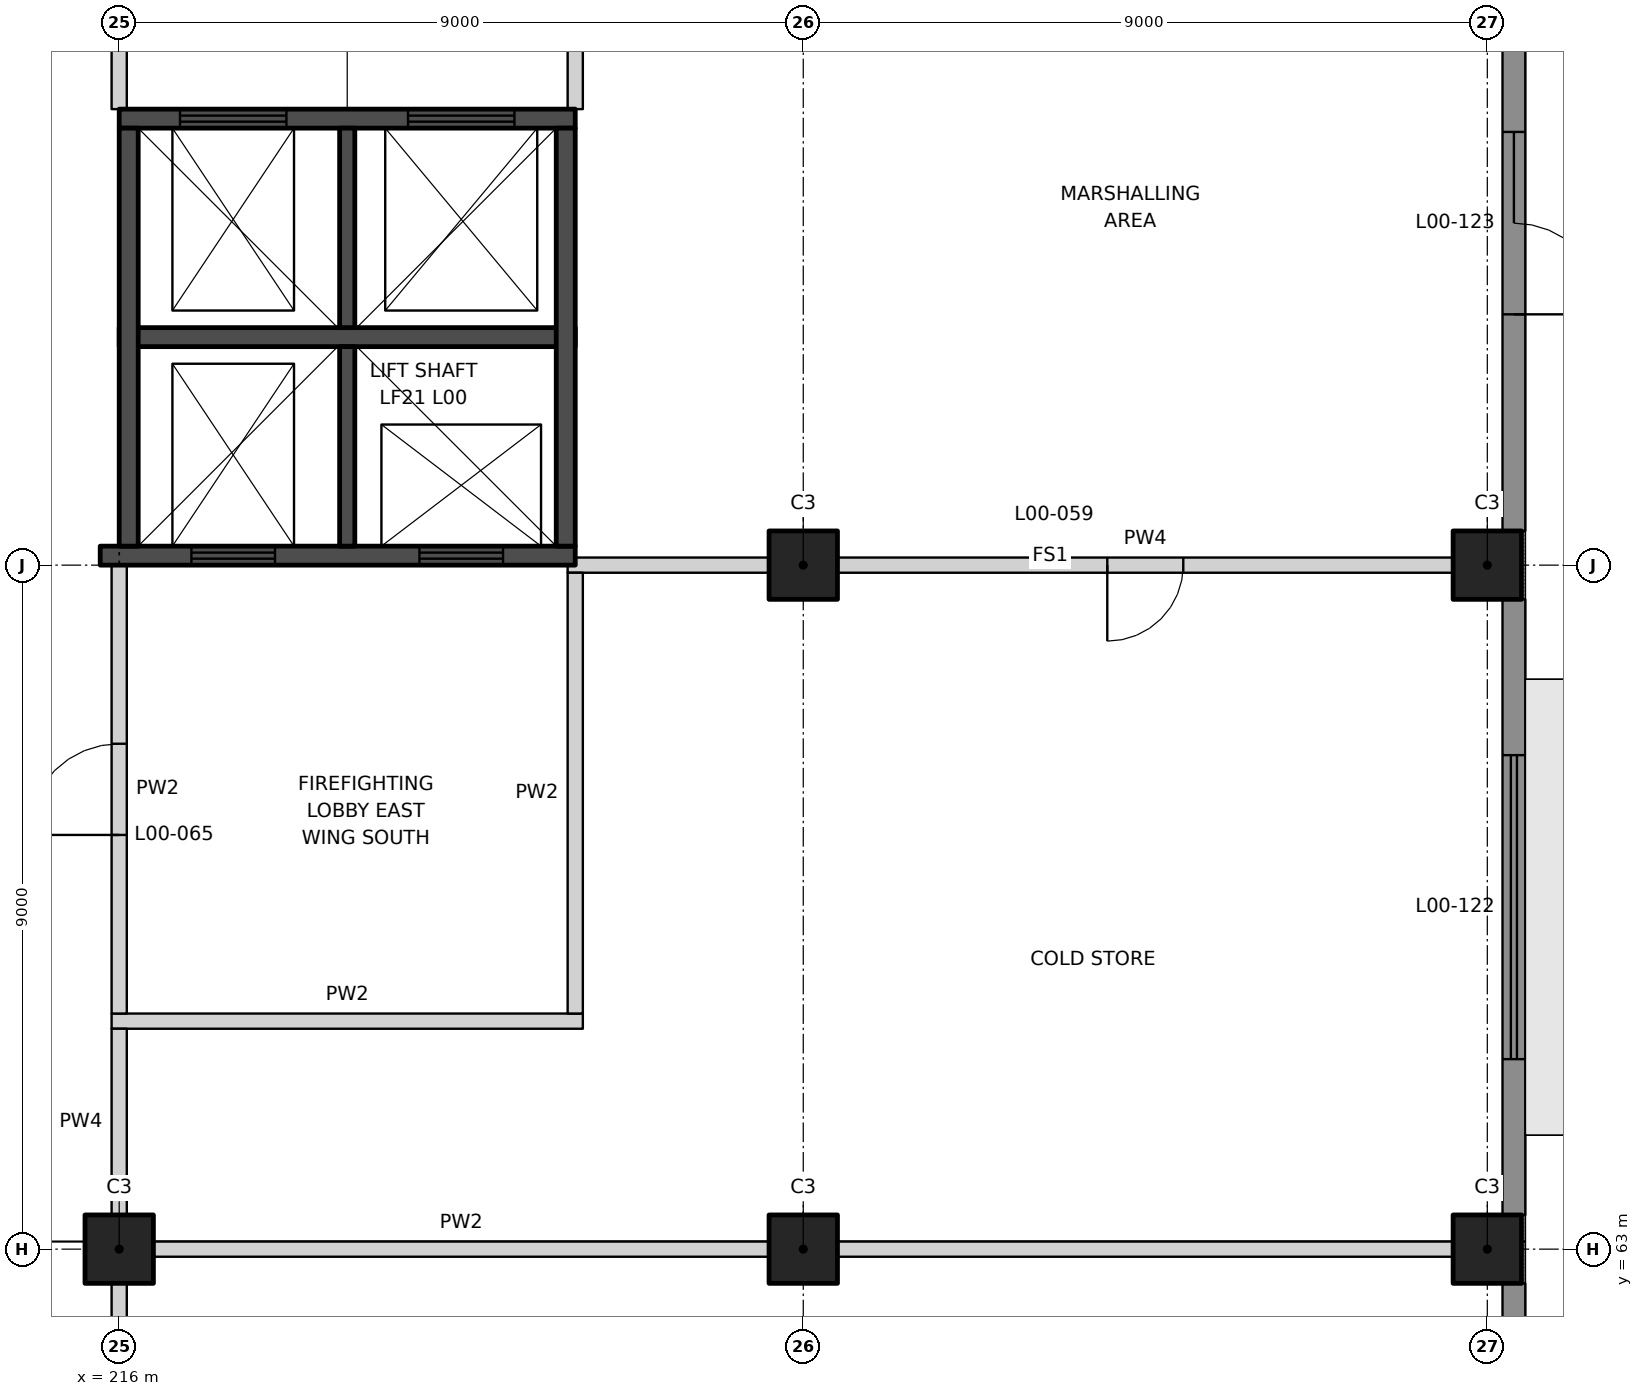
"""IFC4 building model, lengths in metres.
Left out: names, types, materials, properties, quantities, classifications, styles, units other than length and angle.
Written with IfcOpenShell. Run it as: python <this file> out.ifc"""

import sys

from ifc_helpers import new_model, si_unit, direction, frame, frame_2d, origin, origin_2d, place, context, subcontext, project, spatial, rectangle, extrude, element, fill, save


model = new_model("IFC4")
c1 = context("Model", 3, precision=1e-05, world=origin(), true_north=direction((0.0, 1.0)))
c2 = subcontext(c1, "Body", "Model", "MODEL_VIEW")
j1 = project(units=[si_unit("LENGTHUNIT", "METRE"), si_unit("PLANEANGLEUNIT", "RADIAN")], contexts=[c1])
p1 = place(None, origin())
s1 = spatial("IfcSite", under=j1, at=p1, CompositionType="ELEMENT")
p2 = place(p1, origin())
s2 = spatial("IfcBuilding", under=s1, at=p2, CompositionType="ELEMENT")
p3 = place(p2, origin())
s3 = spatial("IfcBuildingStorey", under=s2, at=p3, CompositionType="ELEMENT", Elevation=0.0)
for number, where, z_axis, x_axis in (
    (1, (216.0, 63.0, 0.0), (0.0, 0.0, 1.0), (1.0, 0.0, 0.0)),
    (2, (225.0, 63.0, 0.0), (0.0, 0.0, 1.0), (1.0, 0.0, 0.0)),
    (3, (225.0, 72.0, 0.0), (0.0, 0.0, 1.0), (1.0, 0.0, 0.0)),
    (4, (234.0, 63.0, 0.0), (0.0, 0.0, 1.0), (1.0, 0.0, 0.0)),
    (5, (234.0, 72.0, 0.0), (0.0, 0.0, 1.0), (1.0, 0.0, 0.0)),
):
    element("IfcColumn", number, at=place(p3, frame(where, z_axis=z_axis, x_axis=x_axis)), inside=s3, PredefinedType="COLUMN", context=c2, shape_type="SweptSolid", body=[
        extrude(rectangle(XDim=0.9, YDim=0.9, at=origin_2d()), origin(), (0.0, 0.0, 1.0), 7.0),
    ])
for number, where, z_axis, x_axis in (
    (6, (225.45, 63.0, 0.0), (0.0, 0.0, 1.0), (1.0, 0.0, 0.0)),
    (7, (216.45, 63.0, 0.0), (0.0, 0.0, 1.0), (1.0, 0.0, 0.0)),
):
    element("IfcWall", number, at=place(p3, frame(where, z_axis=z_axis, x_axis=x_axis)), inside=s3, PredefinedType="PARTITIONING", context=c2, shape_type="SweptSolid", body=[
        extrude(rectangle(XDim=8.1, YDim=0.2, at=frame_2d((4.05, 0.0))), origin(), (0.0, 0.0, 1.0), 5.75),
    ])
p4 = place(p3, frame((215.9, 66.0, 0.0), z_axis=(0.0, 0.0, 1.0), x_axis=(1.0, 0.0, 0.0)))
e8 = element("IfcWall", 8, at=p4, inside=s3, PredefinedType="PARTITIONING", context=c2, shape_type="SweptSolid", body=[
    extrude(rectangle(XDim=6.2, YDim=0.2, at=frame_2d((3.1, 0.0))), origin(), (0.0, 0.0, 1.0), 7.0),
])
p5 = place(p3, frame((225.45, 72.0, 0.0), z_axis=(0.0, 0.0, 1.0), x_axis=(1.0, 0.0, 0.0)))
e9 = element("IfcWall", 9, at=p5, inside=s3, PredefinedType="PARTITIONING", context=c2, shape_type="SweptSolid", body=[
    extrude(rectangle(XDim=8.1, YDim=0.2, at=frame_2d((4.05, 0.0))), origin(), (0.0, 0.0, 1.0), 5.75),
])
p6 = place(p5, frame((3.55, 0.0, 0.0)))
e10 = element("IfcOpeningElement", 10, at=p6, cuts=e9, PredefinedType="OPENING", context=c2, shape_type="SweptSolid", body=[
    extrude(rectangle(XDim=1.0, YDim=2.1, at=frame_2d((0.5, 1.05))), frame((0.0, 0.11, 0.0), z_axis=(0.0, -1.0, 0.0), x_axis=(1.0, 0.0, 0.0)), (0.0, 0.0, 1.0), 0.22),
])
p7 = place(p3, frame((221.9, 72.0, 0.0), z_axis=(0.0, 0.0, 1.0), x_axis=(1.0, 0.0, 0.0)))
e11 = element("IfcWall", 11, at=p7, inside=s3, PredefinedType="PARTITIONING", context=c2, shape_type="SweptSolid", body=[
    extrude(rectangle(XDim=2.65, YDim=0.2, at=frame_2d((1.325, 0.0))), origin(), (0.0, 0.0, 1.0), 5.95),
])
p8 = place(p3, frame((216.0, 54.45, 0.0), z_axis=(0.0, 0.0, 1.0), x_axis=(0.0, 1.0, 0.0)))
e12 = element("IfcWall", 12, at=p8, inside=s3, PredefinedType="PARTITIONING", context=c2, shape_type="SweptSolid", body=[
    extrude(rectangle(XDim=8.1, YDim=0.2, at=frame_2d((4.05, 0.0))), origin(), (0.0, 0.0, 1.0), 5.75),
])
p9 = place(p8, frame((3.15, 0.0, 0.0)))
e13 = element("IfcOpeningElement", 13, at=p9, cuts=e12, PredefinedType="OPENING", context=c2, shape_type="SweptSolid", body=[
    extrude(rectangle(XDim=1.8, YDim=2.1, at=frame_2d((0.9, 1.05))), frame((0.0, 0.11, 0.0), z_axis=(0.0, -1.0, 0.0), x_axis=(1.0, 0.0, 0.0)), (0.0, 0.0, 1.0), 0.22),
])
p10 = place(p8, frame((0.2, 0.0, 0.0)))
e14 = element("IfcOpeningElement", 14, at=p10, cuts=e12, PredefinedType="OPENING", context=c2, shape_type="SweptSolid", body=[
    extrude(rectangle(XDim=1.8, YDim=2.1, at=frame_2d((0.9, 1.05))), frame((0.0, 0.11, 0.0), z_axis=(0.0, -1.0, 0.0), x_axis=(1.0, 0.0, 0.0)), (0.0, 0.0, 1.0), 0.22),
])
p11 = place(p3, frame((216.0, 63.45, 0.0), z_axis=(0.0, 0.0, 1.0), x_axis=(0.0, 1.0, 0.0)))
e15 = element("IfcWall", 15, at=p11, inside=s3, PredefinedType="PARTITIONING", context=c2, shape_type="SweptSolid", body=[
    extrude(rectangle(XDim=2.45, YDim=0.2, at=frame_2d((1.225, 0.0))), origin(), (0.0, 0.0, 1.0), 5.65),
])
p12 = place(p3, frame((216.0, 66.1, 0.0), z_axis=(0.0, 0.0, 1.0), x_axis=(0.0, 1.0, 0.0)))
e16 = element("IfcWall", 16, at=p12, inside=s3, PredefinedType="PARTITIONING", context=c2, shape_type="SweptSolid", body=[
    extrude(rectangle(XDim=5.9, YDim=0.2, at=frame_2d((2.95, 0.0))), origin(), (0.0, 0.0, 1.0), 5.65),
])
p13 = place(p12, frame((2.35, 0.0, 0.0)))
e17 = element("IfcOpeningElement", 17, at=p13, cuts=e16, PredefinedType="OPENING", context=c2, shape_type="SweptSolid", body=[
    extrude(rectangle(XDim=1.2, YDim=2.1, at=frame_2d((0.6, 1.05))), frame((0.0, 0.11, 0.0), z_axis=(0.0, -1.0, 0.0), x_axis=(1.0, 0.0, 0.0)), (0.0, 0.0, 1.0), 0.22),
])
p14 = place(p3, frame((216.0, 78.0, 0.0), z_axis=(0.0, 0.0, 1.0), x_axis=(0.0, 1.0, 0.0)))
e18 = element("IfcWall", 18, at=p14, inside=s3, PredefinedType="PARTITIONING", context=c2, shape_type="SweptSolid", body=[
    extrude(rectangle(XDim=2.55, YDim=0.2, at=frame_2d((1.275, 0.0))), origin(), (0.0, 0.0, 1.0), 5.95),
])
p15 = place(p3, frame((222.0, 66.1, 0.0), z_axis=(0.0, 0.0, 1.0), x_axis=(0.0, 1.0, 0.0)))
e19 = element("IfcWall", 19, at=p15, inside=s3, PredefinedType="PARTITIONING", context=c2, shape_type="SweptSolid", body=[
    extrude(rectangle(XDim=5.8, YDim=0.2, at=frame_2d((2.9, 0.0))), origin(), (0.0, 0.0, 1.0), 7.0),
])
p16 = place(p3, frame((222.0, 78.0, 0.0), z_axis=(0.0, 0.0, 1.0), x_axis=(0.0, 1.0, 0.0)))
e20 = element("IfcWall", 20, at=p16, inside=s3, PredefinedType="PARTITIONING", context=c2, shape_type="SweptSolid", body=[
    extrude(rectangle(XDim=5.9, YDim=0.2, at=frame_2d((2.95, 0.0))), origin(), (0.0, 0.0, 1.0), 7.0),
])
p17 = place(p3, frame((234.35, 54.45, 0.0), z_axis=(0.0, 0.0, 1.0), x_axis=(0.0, 1.0, 0.0)))
e21 = element("IfcWall", 21, at=p17, inside=s3, PredefinedType="SOLIDWALL", context=c2, shape_type="SweptSolid", body=[
    extrude(rectangle(XDim=8.1, YDim=0.3, at=frame_2d((4.05, 0.0))), origin(), (0.0, 0.0, 1.0), 7.0),
])
p18 = place(p17, frame((2.85, 0.0, 0.0)))
e22 = element("IfcOpeningElement", 22, at=p18, cuts=e21, PredefinedType="OPENING", context=c2, shape_type="SweptSolid", body=[
    extrude(rectangle(XDim=2.4, YDim=2.4, at=frame_2d((1.2, 1.2))), frame((0.0, 0.16, 0.0), z_axis=(0.0, -1.0, 0.0), x_axis=(1.0, 0.0, 0.0)), (0.0, 0.0, 1.0), 0.32),
])
p19 = place(p3, frame((234.35, 63.45, 0.0), z_axis=(0.0, 0.0, 1.0), x_axis=(0.0, 1.0, 0.0)))
e23 = element("IfcWall", 23, at=p19, inside=s3, PredefinedType="SOLIDWALL", context=c2, shape_type="SweptSolid", body=[
    extrude(rectangle(XDim=8.1, YDim=0.3, at=frame_2d((4.05, 0.0))), origin(), (0.0, 0.0, 1.0), 7.0),
])
p20 = place(p19, frame((2.05, 0.0, 0.0)))
e24 = element("IfcOpeningElement", 24, at=p20, cuts=e23, PredefinedType="OPENING", context=c2, shape_type="SweptSolid", body=[
    extrude(rectangle(XDim=4.0, YDim=4.5, at=frame_2d((2.0, 2.25))), frame((0.0, 0.16, 0.0), z_axis=(0.0, -1.0, 0.0), x_axis=(1.0, 0.0, 0.0)), (0.0, 0.0, 1.0), 0.32),
])
p21 = place(p3, frame((234.35, 72.45, 0.0), z_axis=(0.0, 0.0, 1.0), x_axis=(0.0, 1.0, 0.0)))
e25 = element("IfcWall", 25, at=p21, inside=s3, PredefinedType="SOLIDWALL", context=c2, shape_type="SweptSolid", body=[
    extrude(rectangle(XDim=8.1, YDim=0.3, at=frame_2d((4.05, 0.0))), origin(), (0.0, 0.0, 1.0), 7.0),
])
p22 = place(p21, frame((2.85, 0.0, 0.0)))
e26 = element("IfcOpeningElement", 26, at=p22, cuts=e25, PredefinedType="OPENING", context=c2, shape_type="SweptSolid", body=[
    extrude(rectangle(XDim=2.4, YDim=2.4, at=frame_2d((1.2, 1.2))), frame((0.0, 0.16, 0.0), z_axis=(0.0, -1.0, 0.0), x_axis=(1.0, 0.0, 0.0)), (0.0, 0.0, 1.0), 0.32),
])
p23 = place(p3, frame((215.75, 72.125, 0.0), z_axis=(0.0, 0.0, 1.0), x_axis=(1.0, 0.0, 0.0)))
e27 = element("IfcWall", 27, at=p23, inside=s3, PredefinedType="SHEAR", context=c2, shape_type="SweptSolid", body=[
    extrude(rectangle(XDim=6.25, YDim=0.25, at=frame_2d((3.125, 0.0))), origin(), (0.0, 0.0, 1.0), 7.0),
])
p24 = place(p23, frame((1.2, 0.0, 0.0)))
e28 = element("IfcOpeningElement", 28, at=p24, cuts=e27, PredefinedType="OPENING", context=c2, shape_type="SweptSolid", body=[
    extrude(rectangle(XDim=1.1, YDim=2.1, at=frame_2d((0.55, 1.05))), frame((0.0, 0.135, 0.0), z_axis=(0.0, -1.0, 0.0), x_axis=(1.0, 0.0, 0.0)), (0.0, 0.0, 1.0), 0.27),
])
p25 = place(p23, frame((4.2, 0.0, 0.0)))
e29 = element("IfcOpeningElement", 29, at=p25, cuts=e27, PredefinedType="OPENING", context=c2, shape_type="SweptSolid", body=[
    extrude(rectangle(XDim=1.1, YDim=2.1, at=frame_2d((0.55, 1.05))), frame((0.0, 0.135, 0.0), z_axis=(0.0, -1.0, 0.0), x_axis=(1.0, 0.0, 0.0)), (0.0, 0.0, 1.0), 0.27),
])
p26 = place(p3, frame((216.0, 77.875, 0.0), z_axis=(0.0, 0.0, 1.0), x_axis=(1.0, 0.0, 0.0)))
e30 = element("IfcWall", 30, at=p26, inside=s3, PredefinedType="SHEAR", context=c2, shape_type="SweptSolid", body=[
    extrude(rectangle(XDim=6.0, YDim=0.25, at=frame_2d((3.0, 0.0))), origin(), (0.0, 0.0, 1.0), 7.0),
])
p27 = place(p26, frame((0.8, 0.0, 0.0)))
e31 = element("IfcOpeningElement", 31, at=p27, cuts=e30, PredefinedType="OPENING", context=c2, shape_type="SweptSolid", body=[
    extrude(rectangle(XDim=1.4, YDim=2.1, at=frame_2d((0.7, 1.05))), frame((0.0, 0.135, 0.0), z_axis=(0.0, -1.0, 0.0), x_axis=(1.0, 0.0, 0.0)), (0.0, 0.0, 1.0), 0.27),
])
p28 = place(p26, frame((3.8, 0.0, 0.0)))
e32 = element("IfcOpeningElement", 32, at=p28, cuts=e30, PredefinedType="OPENING", context=c2, shape_type="SweptSolid", body=[
    extrude(rectangle(XDim=1.4, YDim=2.1, at=frame_2d((0.7, 1.05))), frame((0.0, 0.135, 0.0), z_axis=(0.0, -1.0, 0.0), x_axis=(1.0, 0.0, 0.0)), (0.0, 0.0, 1.0), 0.27),
])
p29 = place(p3, frame((216.0, 75.0, 0.0), z_axis=(0.0, 0.0, 1.0), x_axis=(1.0, 0.0, 0.0)))
e33 = element("IfcWall", 33, at=p29, inside=s3, PredefinedType="SHEAR", context=c2, shape_type="SweptSolid", body=[
    extrude(rectangle(XDim=6.0, YDim=0.25, at=frame_2d((3.0, 0.0))), origin(), (0.0, 0.0, 1.0), 7.0),
])
for number, where, z_axis, x_axis in (
    (34, (216.125, 72.25, 0.0), (0.0, 0.0, 1.0), (0.0, 1.0, 0.0)),
    (35, (221.875, 72.25, 0.0), (0.0, 0.0, 1.0), (0.0, 1.0, 0.0)),
):
    element("IfcWall", number, at=place(p3, frame(where, z_axis=z_axis, x_axis=x_axis)), inside=s3, PredefinedType="SHEAR", context=c2, shape_type="SweptSolid", body=[
        extrude(rectangle(XDim=5.5, YDim=0.25, at=frame_2d((2.75, 0.0))), origin(), (0.0, 0.0, 1.0), 7.0),
    ])
for number, where, z_axis, x_axis in (
    (36, (219.0, 72.25, 0.0), (0.0, 0.0, 1.0), (0.0, 1.0, 0.0)),
    (37, (219.0, 75.125, 0.0), (0.0, 0.0, 1.0), (0.0, 1.0, 0.0)),
):
    element("IfcWall", number, at=place(p3, frame(where, z_axis=z_axis, x_axis=x_axis)), inside=s3, PredefinedType="SHEAR", context=c2, shape_type="SweptSolid", body=[
        extrude(rectangle(XDim=2.625, YDim=0.2, at=frame_2d((1.312, 0.0))), origin(), (0.0, 0.0, 1.0), 7.0),
    ])
p30 = place(p6, frame((1.0, 0.0, 0.0), z_axis=(0.0, 0.0, 1.0), x_axis=(-1.0, 0.0, 0.0)))
e38 = element("IfcDoor", 38, at=p30, inside=s3, OperationType="SINGLE_SWING_RIGHT", PredefinedType="DOOR", context=c2, shape_type="SweptSolid", body=[
    extrude(rectangle(XDim=1.0, YDim=2.1, at=frame_2d((0.5, 1.05))), frame((0.0, 0.025, 0.0), z_axis=(0.0, -1.0, 0.0), x_axis=(1.0, 0.0, 0.0)), (0.0, 0.0, 1.0), 0.05),
])
fill(e10, e38)
p31 = place(p13, origin())
e39 = element("IfcDoor", 39, at=p31, inside=s3, OperationType="SINGLE_SWING_LEFT", PredefinedType="DOOR", context=c2, shape_type="SweptSolid", body=[
    extrude(rectangle(XDim=1.2, YDim=2.1, at=frame_2d((0.6, 1.05))), frame((0.0, 0.025, 0.0), z_axis=(0.0, -1.0, 0.0), x_axis=(1.0, 0.0, 0.0)), (0.0, 0.0, 1.0), 0.05),
])
fill(e17, e39)
p32 = place(p20, origin())
e40 = element("IfcDoor", 40, at=p32, inside=s3, OperationType="ROLLINGUP", PredefinedType="DOOR", context=c2, shape_type="SweptSolid", body=[
    extrude(rectangle(XDim=4.0, YDim=4.5, at=frame_2d((2.0, 2.25))), frame((0.0, 0.025, 0.0), z_axis=(0.0, -1.0, 0.0), x_axis=(1.0, 0.0, 0.0)), (0.0, 0.0, 1.0), 0.05),
])
fill(e24, e40)
p33 = place(p22, frame((2.4, 0.0, 0.0), z_axis=(0.0, 0.0, 1.0), x_axis=(-1.0, 0.0, 0.0)))
e41 = element("IfcDoor", 41, at=p33, inside=s3, OperationType="DOUBLE_DOOR_SINGLE_SWING", PredefinedType="DOOR", context=c2, shape_type="SweptSolid", body=[
    extrude(rectangle(XDim=2.4, YDim=2.4, at=frame_2d((1.2, 1.2))), frame((0.0, 0.025, 0.0), z_axis=(0.0, -1.0, 0.0), x_axis=(1.0, 0.0, 0.0)), (0.0, 0.0, 1.0), 0.05),
])
fill(e26, e41)
p34 = place(p24, origin())
e42 = element("IfcDoor", 42, at=p34, inside=s3, OperationType="DOUBLE_DOOR_SLIDING", PredefinedType="DOOR", context=c2, shape_type="SweptSolid", body=[
    extrude(rectangle(XDim=1.1, YDim=2.1, at=frame_2d((0.55, 1.05))), frame((0.0, 0.025, 0.0), z_axis=(0.0, -1.0, 0.0), x_axis=(1.0, 0.0, 0.0)), (0.0, 0.0, 1.0), 0.05),
])
fill(e28, e42)
p35 = place(p25, origin())
e43 = element("IfcDoor", 43, at=p35, inside=s3, OperationType="DOUBLE_DOOR_SLIDING", PredefinedType="DOOR", context=c2, shape_type="SweptSolid", body=[
    extrude(rectangle(XDim=1.1, YDim=2.1, at=frame_2d((0.55, 1.05))), frame((0.0, 0.025, 0.0), z_axis=(0.0, -1.0, 0.0), x_axis=(1.0, 0.0, 0.0)), (0.0, 0.0, 1.0), 0.05),
])
fill(e29, e43)
p36 = place(p27, origin())
e44 = element("IfcDoor", 44, at=p36, inside=s3, OperationType="DOUBLE_DOOR_SLIDING", PredefinedType="DOOR", context=c2, shape_type="SweptSolid", body=[
    extrude(rectangle(XDim=1.4, YDim=2.1, at=frame_2d((0.7, 1.05))), frame((0.0, 0.025, 0.0), z_axis=(0.0, -1.0, 0.0), x_axis=(1.0, 0.0, 0.0)), (0.0, 0.0, 1.0), 0.05),
])
fill(e31, e44)
p37 = place(p28, origin())
e45 = element("IfcDoor", 45, at=p37, inside=s3, OperationType="DOUBLE_DOOR_SLIDING", PredefinedType="DOOR", context=c2, shape_type="SweptSolid", body=[
    extrude(rectangle(XDim=1.4, YDim=2.1, at=frame_2d((0.7, 1.05))), frame((0.0, 0.025, 0.0), z_axis=(0.0, -1.0, 0.0), x_axis=(1.0, 0.0, 0.0)), (0.0, 0.0, 1.0), 0.05),
])
fill(e32, e45)
save(model, sys.argv[1])
